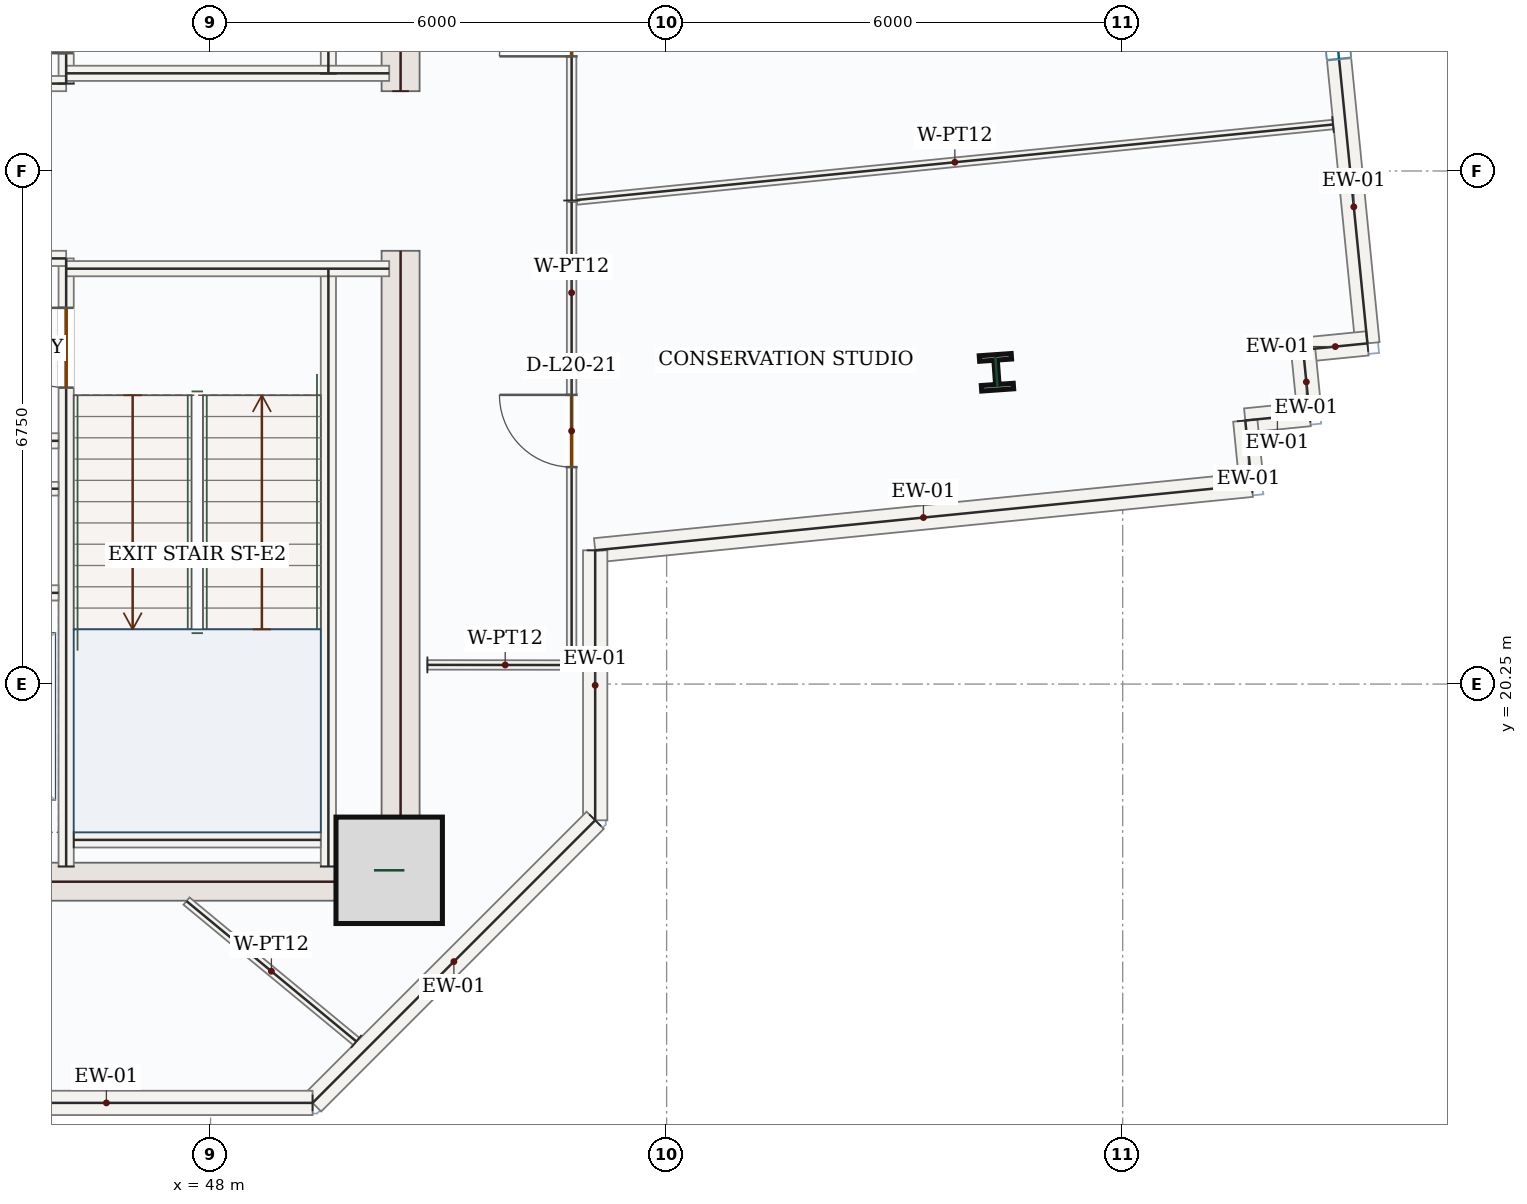
"""IFC4 building model, lengths in metres.
Left out: names, types, materials, properties, quantities, classifications, styles, units other than length and angle.
Written with IfcOpenShell. Run it as: python <this file> out.ifc"""

import sys

from ifc_helpers import new_model, si_unit, direction, frame, frame_2d, origin, origin_2d, place, context, subcontext, project, spatial, rectangle, i_section, extrude, source, transform, mapped, element, fill, save


model = new_model("IFC4")
c1 = context("Model", 3, precision=1e-05, world=origin(), true_north=direction((0.0, 1.0)))
c2 = subcontext(c1, "Body", "Model", "MODEL_VIEW")
j1 = project(units=[si_unit("LENGTHUNIT", "METRE"), si_unit("PLANEANGLEUNIT", "RADIAN")], contexts=[c1])
p1 = place(None, origin())
s1 = spatial("IfcSite", under=j1, at=p1, CompositionType="ELEMENT")
p2 = place(p1, origin())
s2 = spatial("IfcBuilding", under=s1, at=p2, CompositionType="ELEMENT")
p3 = place(p2, frame((0.0, 0.0, 92.1)))
s3 = spatial("IfcBuildingStorey", under=s2, at=p3, CompositionType="ELEMENT", Elevation=92.1)
m1 = source(origin(), c2, "Body", "SweptSolid", [
    extrude(rectangle(XDim=8.55, YDim=0.5, at=frame_2d((4.275, 0.0))), origin(), (0.0, 0.0, 1.0), 3.95),
])
for number, where, z_axis, x_axis in (
    (1, (50.5, 17.4, 0.0), (0.0, 0.0, 1.0), (0.0, 1.0, 0.0)),
    (2, (50.5, 28.05, 0.0), (0.0, 0.0, 1.0), (0.0, 1.0, 0.0)),
):
    element("IfcWall", number, at=place(p3, frame(where, z_axis=z_axis, x_axis=x_axis)), inside=s3, PredefinedType="SHEAR", context=c2, shape_type="MappedRepresentation", body=[
        mapped(m1, transform((0.0, 0.0, 0.0), x_axis=(1.0, 0.0, 0.0), y_axis=(0.0, 1.0, 0.0), z_axis=(0.0, 0.0, 1.0), scale=1.0)),
    ])
m2 = source(origin(), c2, "Body", "SweptSolid", [
    extrude(rectangle(XDim=7.0, YDim=0.5, at=frame_2d((3.5, 0.0))), origin(), (0.0, 0.0, 1.0), 3.95),
])
p4 = place(p3, frame((43.25, 17.65, 0.0), z_axis=(0.0, 0.0, 1.0), x_axis=(1.0, 0.0, 0.0)))
e3 = element("IfcWall", 3, at=p4, inside=s3, PredefinedType="SHEAR", context=c2, shape_type="MappedRepresentation", body=[
    mapped(m2, transform((0.0, 0.0, 0.0), x_axis=(1.0, 0.0, 0.0), y_axis=(0.0, 1.0, 0.0), z_axis=(0.0, 0.0, 1.0), scale=1.0)),
])
m3 = source(origin(), c2, "Body", "SweptSolid", [
    extrude(rectangle(XDim=1.4, YDim=1.4, at=origin_2d()), origin(), (0.0, 0.0, 1.0), 4.2),
])
p5 = place(p3, frame((50.35, 17.8, 0.0), z_axis=(0.0, 0.0, 1.0), x_axis=(1.0, 0.0, 0.0)))
e4 = element("IfcColumn", 4, at=p5, inside=s3, PredefinedType="COLUMN", context=c2, shape_type="MappedRepresentation", body=[
    mapped(m3, transform((0.0, 0.0, 0.0), x_axis=(1.0, 0.0, 0.0), y_axis=(0.0, 1.0, 0.0), z_axis=(0.0, 0.0, 1.0), scale=1.0)),
])
m4 = source(origin(), c2, "Body", "SweptSolid", [
    extrude(i_section(OverallWidth=0.421, OverallDepth=0.465, WebThickness=0.045, FlangeThickness=0.073, FilletRadius=0.018, at=origin_2d()), origin(), (0.0, 0.0, 1.0), 4.2),
])
p6 = place(p3, frame((58.339, 24.352, 0.0), z_axis=(0.0, 0.0, 1.0), x_axis=(0.99756405026, 0.069756473744, 0.0)))
e5 = element("IfcColumn", 5, at=p6, inside=s3, PredefinedType="COLUMN", context=c2, shape_type="MappedRepresentation", body=[
    mapped(m4, transform((0.0, 0.0, 0.0), x_axis=(1.0, 0.0, 0.0), y_axis=(0.0, 1.0, 0.0), z_axis=(0.0, 0.0, 1.0), scale=1.0)),
])
p7 = place(p3, frame((62.235, 34.603, 0.0), z_axis=(0.0, 0.0, 1.0), x_axis=(0.099303907908, -0.995057151059, 0.0)))
e6 = element("IfcWall", 6, at=p7, inside=s3, PredefinedType="SOLIDWALL", context=c2, shape_type="SweptSolid", body=[
    extrude(rectangle(XDim=9.92, YDim=0.32, at=frame_2d((4.96, 0.0))), origin(), (0.0, 0.0, 1.0), 3.95),
])
p8 = place(p7, frame((3.76, 0.0, 0.85)))
e7 = element("IfcOpeningElement", 7, at=p8, cuts=e6, PredefinedType="OPENING", context=c2, shape_type="SweptSolid", body=[
    extrude(rectangle(XDim=2.4, YDim=1.8, at=frame_2d((1.2, 0.9))), frame((0.0, 0.17, 0.0), z_axis=(0.0, -1.0, 0.0), x_axis=(1.0, 0.0, 0.0)), (0.0, 0.0, 1.0), 0.34),
])
m5 = source(origin(), c2, "Body", "SweptSolid", [
    extrude(rectangle(XDim=0.85, YDim=0.32, at=frame_2d((0.425, 0.0))), origin(), (0.0, 0.0, 1.0), 3.95),
])
for number, where, z_axis, x_axis in (
    (8, (63.22, 24.732, 0.0), (0.0, 0.0, 1.0), (-0.995, -0.099, 0.0)),
    (9, (62.374, 24.648, 0.0), (0.0, 0.0, 1.0), (0.099, -0.995, 0.0)),
    (10, (62.458, 23.802, 0.0), (0.0, 0.0, 1.0), (-0.995, -0.099, 0.0)),
    (11, (61.613, 23.718, 0.0), (0.0, 0.0, 1.0), (0.099, -0.995, 0.0)),
):
    element("IfcWall", number, at=place(p3, frame(where, z_axis=z_axis, x_axis=x_axis)), inside=s3, PredefinedType="SOLIDWALL", context=c2, shape_type="MappedRepresentation", body=[
        mapped(m5, transform((0.0, 0.0, 0.0), x_axis=(1.0, 0.0, 0.0), y_axis=(0.0, 1.0, 0.0), z_axis=(0.0, 0.0, 1.0), scale=1.0)),
    ])
m6 = source(origin(), c2, "Body", "SweptSolid", [
    extrude(rectangle(XDim=8.68, YDim=0.32, at=frame_2d((4.34, 0.0))), origin(), (0.0, 0.0, 1.0), 3.95),
])
p9 = place(p3, frame((61.697, 22.872, 0.0), z_axis=(0.0, 0.0, 1.0), x_axis=(-0.995055831351, -0.099317130918, 0.0)))
e12 = element("IfcWall", 12, at=p9, inside=s3, PredefinedType="SOLIDWALL", context=c2, shape_type="MappedRepresentation", body=[
    mapped(m6, transform((0.0, 0.0, 0.0), x_axis=(1.0, 0.0, 0.0), y_axis=(0.0, 1.0, 0.0), z_axis=(0.0, 0.0, 1.0), scale=1.0)),
])
m7 = source(origin(), c2, "Body", "SweptSolid", [
    extrude(rectangle(XDim=3.552, YDim=0.32, at=frame_2d((1.776, 0.0))), origin(), (0.0, 0.0, 1.0), 3.95),
])
p10 = place(p3, frame((53.06, 22.01, 0.0), z_axis=(0.0, 0.0, 1.0), x_axis=(0.0, -1.0, 0.0)))
e13 = element("IfcWall", 13, at=p10, inside=s3, PredefinedType="SOLIDWALL", context=c2, shape_type="MappedRepresentation", body=[
    mapped(m7, transform((0.0, 0.0, 0.0), x_axis=(1.0, 0.0, 0.0), y_axis=(0.0, 1.0, 0.0), z_axis=(0.0, 0.0, 1.0), scale=1.0)),
])
m8 = source(origin(), c2, "Body", "SweptSolid", [
    extrude(rectangle(XDim=5.258, YDim=0.32, at=frame_2d((2.629, 0.0))), origin(), (0.0, 0.0, 1.0), 3.95),
])
p11 = place(p3, frame((53.06, 18.458, 0.0), z_axis=(0.0, 0.0, 1.0), x_axis=(-0.707106781187, -0.707106781187, 0.0)))
e14 = element("IfcWall", 14, at=p11, inside=s3, PredefinedType="SOLIDWALL", context=c2, shape_type="MappedRepresentation", body=[
    mapped(m8, transform((0.0, 0.0, 0.0), x_axis=(1.0, 0.0, 0.0), y_axis=(0.0, 1.0, 0.0), z_axis=(0.0, 0.0, 1.0), scale=1.0)),
])
m9 = source(origin(), c2, "Body", "SweptSolid", [
    extrude(rectangle(XDim=5.425, YDim=0.32, at=frame_2d((2.713, 0.0))), origin(), (0.0, 0.0, 1.0), 3.95),
])
p12 = place(p3, frame((49.342, 14.74, 0.0), z_axis=(0.0, 0.0, 1.0), x_axis=(-1.0, 0.0, 0.0)))
e15 = element("IfcWall", 15, at=p12, inside=s3, PredefinedType="SOLIDWALL", context=c2, shape_type="MappedRepresentation", body=[
    mapped(m9, transform((0.0, 0.0, 0.0), x_axis=(1.0, 0.0, 0.0), y_axis=(0.0, 1.0, 0.0), z_axis=(0.0, 0.0, 1.0), scale=1.0)),
])
m10 = source(origin(), c2, "Body", "SweptSolid", [
    extrude(rectangle(XDim=7.87, YDim=0.2, at=frame_2d((3.935, 0.0))), origin(), (0.0, 0.0, 1.0), 3.95),
])
for number, where, z_axis, x_axis in (
    (16, (49.55, 17.85, 0.0), (0.0, 0.0, 1.0), (0.0, 1.0, 0.0)),
    (17, (49.55, 28.28, 0.0), (0.0, 0.0, 1.0), (0.0, 1.0, 0.0)),
):
    element("IfcWall", number, at=place(p3, frame(where, z_axis=z_axis, x_axis=x_axis)), inside=s3, PredefinedType="SOLIDWALL", context=c2, shape_type="MappedRepresentation", body=[
        mapped(m10, transform((0.0, 0.0, 0.0), x_axis=(1.0, 0.0, 0.0), y_axis=(0.0, 1.0, 0.0), z_axis=(0.0, 0.0, 1.0), scale=1.0)),
    ])
p13 = place(p3, frame((46.1, 17.85, 0.0), z_axis=(0.0, 0.0, 1.0), x_axis=(0.0, 1.0, 0.0)))
e18 = element("IfcWall", 18, at=p13, inside=s3, PredefinedType="SOLIDWALL", context=c2, shape_type="SweptSolid", body=[
    extrude(rectangle(XDim=8.0, YDim=0.2, at=frame_2d((4.0, 0.0))), origin(), (0.0, 0.0, 1.0), 3.95),
])
p14 = place(p13, frame((6.3, 0.0, 0.0)))
e19 = element("IfcOpeningElement", 19, at=p14, cuts=e18, PredefinedType="OPENING", context=c2, shape_type="SweptSolid", body=[
    extrude(rectangle(XDim=1.05, YDim=2.15, at=frame_2d((0.525, 1.075))), frame((0.0, 0.11, 0.0), z_axis=(0.0, -1.0, 0.0), x_axis=(1.0, 0.0, 0.0)), (0.0, 0.0, 1.0), 0.22),
])
p15 = place(p3, frame((46.1, 28.15, 0.0), z_axis=(0.0, 0.0, 1.0), x_axis=(0.0, 1.0, 0.0)))
e20 = element("IfcWall", 20, at=p15, inside=s3, PredefinedType="SOLIDWALL", context=c2, shape_type="SweptSolid", body=[
    extrude(rectangle(XDim=8.0, YDim=0.2, at=frame_2d((4.0, 0.0))), origin(), (0.0, 0.0, 1.0), 3.95),
])
p16 = place(p15, frame((0.4, 0.0, 0.0)))
e21 = element("IfcOpeningElement", 21, at=p16, cuts=e20, PredefinedType="OPENING", context=c2, shape_type="SweptSolid", body=[
    extrude(rectangle(XDim=1.05, YDim=2.15, at=frame_2d((0.525, 1.075))), frame((0.0, 0.11, 0.0), z_axis=(0.0, -1.0, 0.0), x_axis=(1.0, 0.0, 0.0)), (0.0, 0.0, 1.0), 0.22),
])
m11 = source(origin(), c2, "Body", "SweptSolid", [
    extrude(rectangle(XDim=3.0, YDim=0.2, at=frame_2d((1.5, 0.0))), origin(), (0.0, 0.0, 1.0), 3.95),
])
p17 = place(p3, frame((43.1, 25.85, 0.0), z_axis=(0.0, 0.0, 1.0), x_axis=(1.0, 0.0, 0.0)))
e22 = element("IfcWall", 22, at=p17, inside=s3, PredefinedType="SOLIDWALL", context=c2, shape_type="MappedRepresentation", body=[
    mapped(m11, transform((0.0, 0.0, 0.0), x_axis=(1.0, 0.0, 0.0), y_axis=(0.0, 1.0, 0.0), z_axis=(0.0, 0.0, 1.0), scale=1.0)),
])
m12 = source(origin(), c2, "Body", "SweptSolid", [
    extrude(rectangle(XDim=4.25, YDim=0.2, at=frame_2d((2.125, 0.0))), origin(), (0.0, 0.0, 1.0), 3.95),
])
p18 = place(p3, frame((46.1, 25.715, 0.0), z_axis=(0.0, 0.0, 1.0), x_axis=(1.0, 0.0, 0.0)))
e23 = element("IfcWall", 23, at=p18, inside=s3, PredefinedType="SOLIDWALL", context=c2, shape_type="MappedRepresentation", body=[
    mapped(m12, transform((0.0, 0.0, 0.0), x_axis=(1.0, 0.0, 0.0), y_axis=(0.0, 1.0, 0.0), z_axis=(0.0, 0.0, 1.0), scale=1.0)),
])
p19 = place(p3, frame((43.1, 28.15, 0.0), z_axis=(0.0, 0.0, 1.0), x_axis=(1.0, 0.0, 0.0)))
e24 = element("IfcWall", 24, at=p19, inside=s3, PredefinedType="SOLIDWALL", context=c2, shape_type="MappedRepresentation", body=[
    mapped(m11, transform((0.0, 0.0, 0.0), x_axis=(1.0, 0.0, 0.0), y_axis=(0.0, 1.0, 0.0), z_axis=(0.0, 0.0, 1.0), scale=1.0)),
])
p20 = place(p3, frame((46.1, 28.285, 0.0), z_axis=(0.0, 0.0, 1.0), x_axis=(1.0, 0.0, 0.0)))
e25 = element("IfcWall", 25, at=p20, inside=s3, PredefinedType="SOLIDWALL", context=c2, shape_type="MappedRepresentation", body=[
    mapped(m12, transform((0.0, 0.0, 0.0), x_axis=(1.0, 0.0, 0.0), y_axis=(0.0, 1.0, 0.0), z_axis=(0.0, 0.0, 1.0), scale=1.0)),
])
m13 = source(origin(), c2, "Body", "SweptSolid", [
    extrude(rectangle(XDim=3.25, YDim=0.2, at=frame_2d((1.625, 0.0))), origin(), (0.0, 0.0, 1.0), 3.95),
])
p21 = place(p3, frame((46.2, 18.2, 0.0), z_axis=(0.0, 0.0, 1.0), x_axis=(1.0, 0.0, 0.0)))
e26 = element("IfcWall", 26, at=p21, inside=s3, PredefinedType="SOLIDWALL", context=c2, shape_type="MappedRepresentation", body=[
    mapped(m13, transform((0.0, 0.0, 0.0), x_axis=(1.0, 0.0, 0.0), y_axis=(0.0, 1.0, 0.0), z_axis=(0.0, 0.0, 1.0), scale=1.0)),
])
m14 = source(origin(), c2, "Body", "SweptSolid", [
    extrude(rectangle(XDim=2.75, YDim=0.2, at=frame_2d((1.375, 0.0))), origin(), (0.0, 0.0, 1.0), 3.95),
])
for number, where, z_axis, x_axis in (
    (27, (43.25, 23.45, 0.0), (0.0, 0.0, 1.0), (1.0, 0.0, 0.0)),
    (28, (43.25, 21.45, 0.0), (0.0, 0.0, 1.0), (1.0, 0.0, 0.0)),
):
    element("IfcWall", number, at=place(p3, frame(where, z_axis=z_axis, x_axis=x_axis)), inside=s3, PredefinedType="SOLIDWALL", context=c2, shape_type="MappedRepresentation", body=[
        mapped(m14, transform((0.0, 0.0, 0.0), x_axis=(1.0, 0.0, 0.0), y_axis=(0.0, 1.0, 0.0), z_axis=(0.0, 0.0, 1.0), scale=1.0)),
    ])
m15 = source(origin(), c2, "Body", "SweptSolid", [
    extrude(rectangle(XDim=2.75, YDim=0.18, at=frame_2d((1.375, 0.0))), origin(), (0.0, 0.0, 1.0), 3.95),
])
p22 = place(p3, frame((43.25, 22.82, 0.0), z_axis=(0.0, 0.0, 1.0), x_axis=(1.0, 0.0, 0.0)))
e29 = element("IfcWall", 29, at=p22, inside=s3, PredefinedType="PARTITIONING", context=c2, shape_type="MappedRepresentation", body=[
    mapped(m15, transform((0.0, 0.0, 0.0), x_axis=(1.0, 0.0, 0.0), y_axis=(0.0, 1.0, 0.0), z_axis=(0.0, 0.0, 1.0), scale=1.0)),
])
p23 = place(p3, frame((52.75, 26.612, 0.0), z_axis=(0.0, 0.0, 1.0), x_axis=(0.0, 1.0, 0.0)))
e30 = element("IfcWall", 30, at=p23, inside=s3, PredefinedType="PARTITIONING", context=c2, shape_type="SweptSolid", body=[
    extrude(rectangle(XDim=4.743, YDim=0.125, at=frame_2d((2.372, 0.0))), origin(), (0.0, 0.0, 1.0), 3.95),
])
p24 = place(p23, frame((1.897, 0.0, 0.0)))
e31 = element("IfcOpeningElement", 31, at=p24, cuts=e30, PredefinedType="OPENING", context=c2, shape_type="SweptSolid", body=[
    extrude(rectangle(XDim=0.95, YDim=2.15, at=frame_2d((0.475, 1.075))), frame((0.0, 0.073, 0.0), z_axis=(0.0, -1.0, 0.0), x_axis=(1.0, 0.0, 0.0)), (0.0, 0.0, 1.0), 0.145),
])
m16 = source(origin(), c2, "Body", "SweptSolid", [
    extrude(rectangle(XDim=9.999, YDim=0.125, at=frame_2d((5.0, 0.0))), origin(), (0.0, 0.0, 1.0), 3.95),
])
p25 = place(p3, frame((62.767, 27.612, 0.0), z_axis=(0.0, 0.0, 1.0), x_axis=(-0.995054581391, -0.099329653443, 0.0)))
e32 = element("IfcWall", 32, at=p25, inside=s3, PredefinedType="PARTITIONING", context=c2, shape_type="MappedRepresentation", body=[
    mapped(m16, transform((0.0, 0.0, 0.0), x_axis=(1.0, 0.0, 0.0), y_axis=(0.0, 1.0, 0.0), z_axis=(0.0, 0.0, 1.0), scale=1.0)),
])
m17 = source(origin(), c2, "Body", "SweptSolid", [
    extrude(rectangle(XDim=2.047, YDim=0.125, at=frame_2d((1.024, 0.0))), origin(), (0.0, 0.0, 1.0), 3.95),
])
p26 = place(p3, frame((50.853, 20.502, 0.0), z_axis=(0.0, 0.0, 1.0), x_axis=(0.999999289016, -0.001192462782, 0.0)))
e33 = element("IfcWall", 33, at=p26, inside=s3, PredefinedType="PARTITIONING", context=c2, shape_type="MappedRepresentation", body=[
    mapped(m17, transform((0.0, 0.0, 0.0), x_axis=(1.0, 0.0, 0.0), y_axis=(0.0, 1.0, 0.0), z_axis=(0.0, 0.0, 1.0), scale=1.0)),
])
p27 = place(p3, frame((52.75, 20.568, 0.0), z_axis=(0.0, 0.0, 1.0), x_axis=(0.0, 1.0, 0.0)))
e34 = element("IfcWall", 34, at=p27, inside=s3, PredefinedType="PARTITIONING", context=c2, shape_type="SweptSolid", body=[
    extrude(rectangle(XDim=6.024, YDim=0.125, at=frame_2d((3.012, 0.0))), origin(), (0.0, 0.0, 1.0), 3.95),
])
p28 = place(p27, frame((2.537, 0.0, 0.0)))
e35 = element("IfcOpeningElement", 35, at=p28, cuts=e34, PredefinedType="OPENING", context=c2, shape_type="SweptSolid", body=[
    extrude(rectangle(XDim=0.95, YDim=2.15, at=frame_2d((0.475, 1.075))), frame((0.0, 0.073, 0.0), z_axis=(0.0, -1.0, 0.0), x_axis=(1.0, 0.0, 0.0)), (0.0, 0.0, 1.0), 0.145),
])
m18 = source(origin(), c2, "Body", "SweptSolid", [
    extrude(rectangle(XDim=2.898, YDim=0.125, at=frame_2d((1.449, 0.0))), origin(), (0.0, 0.0, 1.0), 3.95),
])
p29 = place(p3, frame((49.917, 15.549, 0.0), z_axis=(0.0, 0.0, 1.0), x_axis=(-0.770859236659, 0.637005523726, 0.0)))
e36 = element("IfcWall", 36, at=p29, inside=s3, PredefinedType="PARTITIONING", context=c2, shape_type="MappedRepresentation", body=[
    mapped(m18, transform((0.0, 0.0, 0.0), x_axis=(1.0, 0.0, 0.0), y_axis=(0.0, 1.0, 0.0), z_axis=(0.0, 0.0, 1.0), scale=1.0)),
])
m19 = source(origin(), c2, "Body", "SweptSolid", [
    extrude(rectangle(XDim=2.4, YDim=1.8, at=frame_2d((1.2, 0.9))), frame((0.0, 0.03, 0.0), z_axis=(0.0, -1.0, 0.0), x_axis=(1.0, 0.0, 0.0)), (0.0, 0.0, 1.0), 0.06),
])
p30 = place(p8, origin())
e37 = element("IfcWindow", 37, at=p30, inside=s3, PartitioningType="DOUBLE_PANEL_VERTICAL", PredefinedType="WINDOW", context=c2, shape_type="MappedRepresentation", body=[
    mapped(m19, transform((0.0, 0.0, 0.0), x_axis=(1.0, 0.0, 0.0), y_axis=(0.0, 1.0, 0.0), z_axis=(0.0, 0.0, 1.0), scale=1.0)),
])
fill(e7, e37)
m20 = source(origin(), c2, "Body", "SweptSolid", [
    extrude(rectangle(XDim=1.05, YDim=2.15, at=frame_2d((0.525, 1.075))), frame((0.0, 0.025, 0.0), z_axis=(0.0, -1.0, 0.0), x_axis=(1.0, 0.0, 0.0)), (0.0, 0.0, 1.0), 0.05),
])
p31 = place(p16, origin())
e38 = element("IfcDoor", 38, at=p31, inside=s3, OperationType="SINGLE_SWING_LEFT", PredefinedType="DOOR", context=c2, shape_type="MappedRepresentation", body=[
    mapped(m20, transform((0.0, 0.0, 0.0), x_axis=(1.0, 0.0, 0.0), y_axis=(0.0, 1.0, 0.0), z_axis=(0.0, 0.0, 1.0), scale=1.0)),
])
fill(e21, e38)
p32 = place(p14, origin())
e39 = element("IfcDoor", 39, at=p32, inside=s3, OperationType="SINGLE_SWING_RIGHT", PredefinedType="DOOR", context=c2, shape_type="MappedRepresentation", body=[
    mapped(m20, transform((0.0, 0.0, 0.0), x_axis=(1.0, 0.0, 0.0), y_axis=(0.0, 1.0, 0.0), z_axis=(0.0, 0.0, 1.0), scale=1.0)),
])
fill(e19, e39)
m21 = source(origin(), c2, "Body", "SweptSolid", [
    extrude(rectangle(XDim=0.95, YDim=2.15, at=frame_2d((0.475, 1.075))), frame((0.0, 0.025, 0.0), z_axis=(0.0, -1.0, 0.0), x_axis=(1.0, 0.0, 0.0)), (0.0, 0.0, 1.0), 0.05),
])
p33 = place(p28, origin())
e40 = element("IfcDoor", 40, at=p33, inside=s3, OperationType="SINGLE_SWING_RIGHT", PredefinedType="DOOR", context=c2, shape_type="MappedRepresentation", body=[
    mapped(m21, transform((0.0, 0.0, 0.0), x_axis=(1.0, 0.0, 0.0), y_axis=(0.0, 1.0, 0.0), z_axis=(0.0, 0.0, 1.0), scale=1.0)),
])
fill(e35, e40)
p34 = place(p24, origin())
e41 = element("IfcDoor", 41, at=p34, inside=s3, OperationType="SINGLE_SWING_LEFT", PredefinedType="DOOR", context=c2, shape_type="MappedRepresentation", body=[
    mapped(m21, transform((0.0, 0.0, 0.0), x_axis=(1.0, 0.0, 0.0), y_axis=(0.0, 1.0, 0.0), z_axis=(0.0, 0.0, 1.0), scale=1.0)),
])
fill(e31, e41)
save(model, sys.argv[1])
